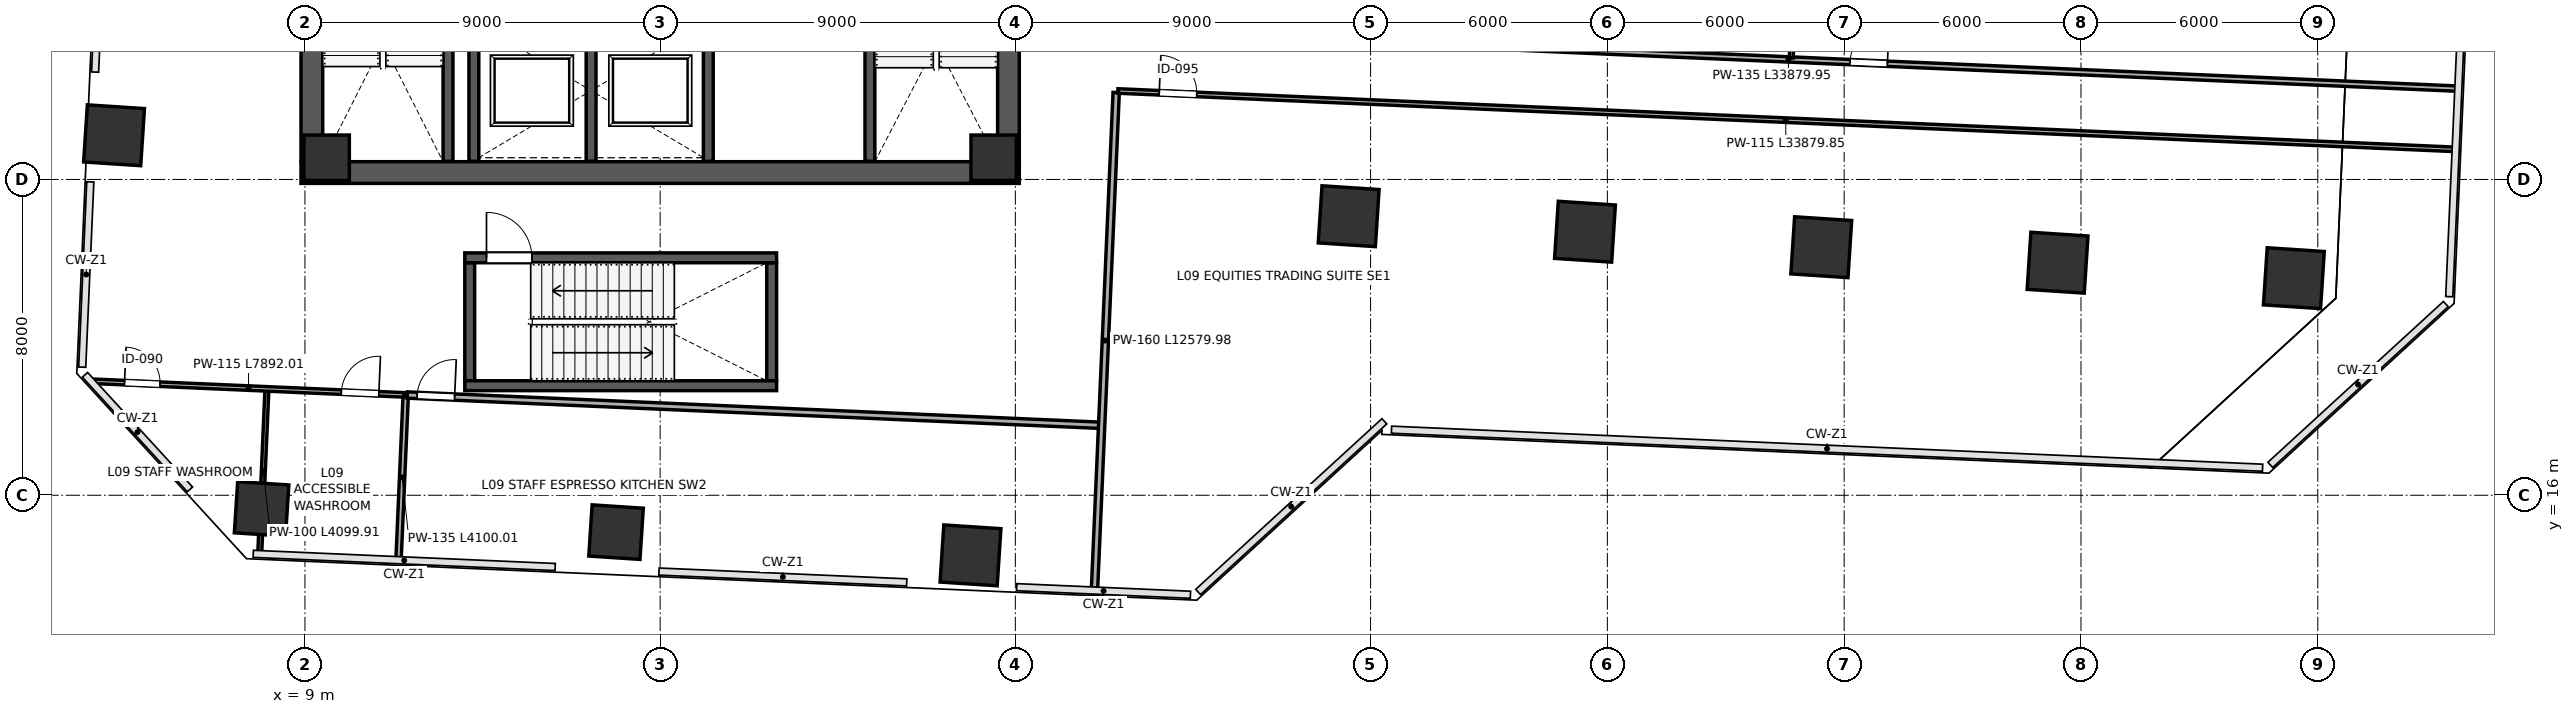
"""IFC4 building model, lengths in metres.
Left out: names, types, materials, properties, quantities, classifications, styles, units other than length and angle.
Written with IfcOpenShell. Run it as: python <this file> out.ifc"""

import sys

from ifc_helpers import new_model, si_unit, direction, frame, frame_2d, origin, origin_2d, place, context, subcontext, project, spatial, rectangle, extrude, clip, halfspace, source, transform, mapped, element, fill, save


model = new_model("IFC4")
c1 = context("Model", 3, precision=1e-05, world=origin(), true_north=direction((0.0, 1.0)))
c2 = subcontext(c1, "Body", "Model", "MODEL_VIEW")
j1 = project(units=[si_unit("LENGTHUNIT", "METRE"), si_unit("PLANEANGLEUNIT", "RADIAN")], contexts=[c1])
p1 = place(None, origin())
s1 = spatial("IfcSite", under=j1, at=p1, CompositionType="ELEMENT")
p2 = place(p1, origin())
s2 = spatial("IfcBuilding", under=s1, at=p2, CompositionType="ELEMENT")
p3 = place(p2, frame((0.0, 0.0, 42.4)))
s3 = spatial("IfcBuildingStorey", under=s2, at=p3, CompositionType="ELEMENT", Elevation=42.4)
m1 = source(origin(), c2, "Body", "SweptSolid", [
    extrude(rectangle(XDim=1.15, YDim=1.15, at=origin_2d()), origin(), (0.0, 0.0, 1.0), 4.799),
])
for number, where, z_axis, x_axis in (
    (1, (9.55, 24.55, 0.001), (0.0, 0.0, 1.0), (1.0, 0.0, 0.0)),
    (2, (26.45, 24.55, 0.001), (0.0, 0.0, 1.0), (1.0, 0.0, 0.0)),
):
    element("IfcColumn", number, at=place(p3, frame(where, z_axis=z_axis, x_axis=x_axis)), inside=s3, PredefinedType="COLUMN", context=c2, shape_type="MappedRepresentation", body=[
        mapped(m1, transform((0.0, 0.0, 0.0), scale=1.0)),
    ])
p4 = place(p3, frame((7.902, 15.654, 0.0), z_axis=(-0.073256283679, 0.062320998763, 0.995364059033), x_axis=(0.696166311011, 0.717852978143, 0.006290404147)))
e3 = element("IfcColumn", 3, at=p4, inside=s3, PredefinedType="COLUMN", context=c2, shape_type="Clipping", body=[
    clip(clip(extrude(rectangle(XDim=1.3, YDim=1.3, at=origin_2d()), origin(), (0.0, 0.0, 1.0), 4.823), halfspace(frame((0.0, 0.0, 0.068), z_axis=(0.0, 0.0, -1.0), x_axis=(1.0, 0.0, 0.0)), False)), halfspace(frame((0.0, 0.0, 4.755), z_axis=(0.0, 0.0, 1.0), x_axis=(1.0, 0.0, 0.0)), False)),
])
p5 = place(p3, frame((16.883, 15.066, 0.0), z_axis=(-0.076507759462, 0.021750714917, 0.996831715558), x_axis=(0.335583461966, 0.941996113517, 0.005202131703)))
e4 = element("IfcColumn", 4, at=p5, inside=s3, PredefinedType="COLUMN", context=c2, shape_type="Clipping", body=[
    clip(clip(extrude(rectangle(XDim=1.3, YDim=1.3, at=origin_2d()), origin(), (0.0, 0.0, 1.0), 4.815), halfspace(frame((0.0, 0.0, 0.056), z_axis=(0.0, 0.0, -1.0), x_axis=(1.0, 0.0, 0.0)), False)), halfspace(frame((0.0, 0.0, 4.759), z_axis=(0.0, 0.0, 1.0), x_axis=(1.0, 0.0, 0.0)), False)),
])
p6 = place(p3, frame((25.863, 14.477, 0.0), z_axis=(-0.079585901661, -0.018907988102, 0.996648670416), x_axis=(-0.167232150884, 0.985903030052, 0.005350051031)))
e5 = element("IfcColumn", 5, at=p6, inside=s3, PredefinedType="COLUMN", context=c2, shape_type="Clipping", body=[
    clip(clip(extrude(rectangle(XDim=1.45, YDim=1.45, at=origin_2d()), origin(), (0.0, 0.0, 1.0), 4.816), halfspace(frame((0.0, 0.0, 0.064), z_axis=(0.0, 0.0, -1.0), x_axis=(1.0, 0.0, 0.0)), False)), halfspace(frame((0.0, 0.0, 4.752), z_axis=(0.0, 0.0, 1.0), x_axis=(1.0, 0.0, 0.0)), False)),
])
p7 = place(p3, frame((35.446, 23.069, 0.0), z_axis=(-0.04118343383, -0.062789521037, 0.997176714944), x_axis=(-0.798624033663, 0.601810213736, 0.004911160636)))
e6 = element("IfcColumn", 6, at=p7, inside=s3, PredefinedType="COLUMN", context=c2, shape_type="Clipping", body=[
    clip(clip(extrude(rectangle(XDim=1.45, YDim=1.45, at=origin_2d()), origin(), (0.0, 0.0, 1.0), 4.814), halfspace(frame((0.0, 0.0, 0.059), z_axis=(0.0, 0.0, -1.0), x_axis=(1.0, 0.0, 0.0)), False)), halfspace(frame((0.0, 0.0, 4.755), z_axis=(0.0, 0.0, 1.0), x_axis=(1.0, 0.0, 0.0)), False)),
])
p8 = place(p3, frame((41.433, 22.677, 0.0), z_axis=(-0.043169759847, -0.089730344911, 0.995030068408), x_axis=(-0.870990685496, 0.491256361773, 0.006512510793)))
e7 = element("IfcColumn", 7, at=p8, inside=s3, PredefinedType="COLUMN", context=c2, shape_type="Clipping", body=[
    clip(clip(extrude(rectangle(XDim=1.45, YDim=1.45, at=origin_2d()), origin(), (0.0, 0.0, 1.0), 4.824), halfspace(frame((0.0, 0.0, 0.078), z_axis=(0.0, 0.0, -1.0), x_axis=(1.0, 0.0, 0.0)), False)), halfspace(frame((0.0, 0.0, 4.746), z_axis=(0.0, 0.0, 1.0), x_axis=(1.0, 0.0, 0.0)), False)),
])
p9 = place(p3, frame((47.42, 22.284, 0.0), z_axis=(-0.045064550485, -0.116420960772, 0.992177074006), x_axis=(-0.907151071191, 0.420725884157, 0.008164829265)))
e8 = element("IfcColumn", 8, at=p9, inside=s3, PredefinedType="COLUMN", context=c2, shape_type="Clipping", body=[
    clip(clip(extrude(rectangle(XDim=1.45, YDim=1.45, at=origin_2d()), origin(), (0.0, 0.0, 1.0), 4.838), halfspace(frame((0.0, 0.0, 0.098), z_axis=(0.0, 0.0, -1.0), x_axis=(1.0, 0.0, 0.0)), False)), halfspace(frame((0.0, 0.0, 4.74), z_axis=(0.0, 0.0, 1.0), x_axis=(1.0, 0.0, 0.0)), False)),
])
p10 = place(p3, frame((53.407, 21.892, 0.0), z_axis=(-0.046965010529, -0.142856097337, 0.988628556759), x_axis=(-0.927751383224, 0.373069215808, 0.009835199134)))
e9 = element("IfcColumn", 9, at=p10, inside=s3, PredefinedType="COLUMN", context=c2, shape_type="Clipping", body=[
    clip(clip(extrude(rectangle(XDim=1.45, YDim=1.45, at=origin_2d()), origin(), (0.0, 0.0, 1.0), 4.855), halfspace(frame((0.0, 0.0, 0.118), z_axis=(0.0, 0.0, -1.0), x_axis=(1.0, 0.0, 0.0)), False)), halfspace(frame((0.0, 0.0, 4.737), z_axis=(0.0, 0.0, 1.0), x_axis=(1.0, 0.0, 0.0)), False)),
])
p11 = place(p3, frame((59.394, 21.499, 0.0), z_axis=(-0.048816991024, -0.169031960715, 0.98440088259), x_axis=(-0.940815168833, 0.338724676328, 0.011507030043)))
e10 = element("IfcColumn", 10, at=p11, inside=s3, PredefinedType="COLUMN", context=c2, shape_type="Clipping", body=[
    clip(clip(extrude(rectangle(XDim=1.45, YDim=1.45, at=origin_2d()), origin(), (0.0, 0.0, 1.0), 4.876), halfspace(frame((0.0, 0.0, 0.138), z_axis=(0.0, 0.0, -1.0), x_axis=(1.0, 0.0, 0.0)), False)), halfspace(frame((0.0, 0.0, 4.738), z_axis=(0.0, 0.0, 1.0), x_axis=(1.0, 0.0, 0.0)), False)),
])
p12 = place(p3, frame((4.163, 25.119, 0.0), z_axis=(-0.030306808668, 0.078858518875, 0.996425025453), x_axis=(0.954818480611, 0.297138249558, 0.005525371807)))
e11 = element("IfcColumn", 11, at=p12, inside=s3, PredefinedType="COLUMN", context=c2, shape_type="Clipping", body=[
    clip(clip(extrude(rectangle(XDim=1.45, YDim=1.45, at=origin_2d()), origin(), (0.0, 0.0, 1.0), 4.817), halfspace(frame((0.0, 0.0, 0.066), z_axis=(0.0, 0.0, -1.0), x_axis=(1.0, 0.0, 0.0)), False)), halfspace(frame((0.0, 0.0, 4.751), z_axis=(0.0, 0.0, 1.0), x_axis=(1.0, 0.0, 0.0)), False)),
])
p13 = place(p3, frame((9.175, 24.45, 0.0), z_axis=(0.0, 0.0, 1.0), x_axis=(0.0, 1.0, 0.0)))
e12 = element("IfcWall", 12, at=p13, inside=s3, PredefinedType="SHEAR", context=c2, shape_type="SweptSolid", body=[
    extrude(rectangle(XDim=15.1, YDim=0.55, at=frame_2d((7.55, 0.0))), origin(), (0.0, 0.0, 1.0), 4.56),
])
p14 = place(p3, frame((26.825, 24.45, 0.0), z_axis=(0.0, 0.0, 1.0), x_axis=(0.0, 1.0, 0.0)))
e13 = element("IfcWall", 13, at=p14, inside=s3, PredefinedType="SHEAR", context=c2, shape_type="SweptSolid", body=[
    extrude(rectangle(XDim=15.1, YDim=0.55, at=frame_2d((7.55, 0.0))), origin(), (0.0, 0.0, 1.0), 4.56),
])
p15 = place(p14, frame((8.6, 0.0, 0.0)))
e14 = element("IfcOpeningElement", 14, at=p15, cuts=e13, PredefinedType="OPENING", context=c2, shape_type="SweptSolid", body=[
    extrude(rectangle(XDim=1.15, YDim=2.2, at=frame_2d((0.575, 1.1))), frame((0.0, 0.285, 0.0), z_axis=(0.0, -1.0, 0.0), x_axis=(1.0, 0.0, 0.0)), (0.0, 0.0, 1.0), 0.57),
])
p16 = place(p3, frame((8.9, 24.175, 0.0), z_axis=(0.0, 0.0, 1.0), x_axis=(1.0, 0.0, 0.0)))
e15 = element("IfcWall", 15, at=p16, inside=s3, PredefinedType="SHEAR", context=c2, shape_type="SweptSolid", body=[
    extrude(rectangle(XDim=18.2, YDim=0.55, at=frame_2d((9.1, 0.0))), origin(), (0.0, 0.0, 1.0), 4.56),
])
p17 = place(p3, frame((12.625, 24.46, 0.0), z_axis=(0.0, 0.0, 1.0), x_axis=(0.0, 1.0, 0.0)))
e16 = element("IfcWall", 16, at=p17, inside=s3, PredefinedType="SHEAR", context=c2, shape_type="SweptSolid", body=[
    extrude(rectangle(XDim=7.49, YDim=0.25, at=frame_2d((3.745, 0.0))), origin(), (0.0, 0.0, 1.0), 4.56),
])
p18 = place(p17, frame((5.85, 0.0, 0.0)))
e17 = element("IfcOpeningElement", 17, at=p18, cuts=e16, PredefinedType="OPENING", context=c2, shape_type="SweptSolid", body=[
    extrude(rectangle(XDim=1.15, YDim=2.2, at=frame_2d((0.575, 1.1))), frame((0.0, 0.135, 0.0), z_axis=(0.0, -1.0, 0.0), x_axis=(1.0, 0.0, 0.0)), (0.0, 0.0, 1.0), 0.27),
])
p19 = place(p3, frame((23.315, 24.46, 0.0), z_axis=(0.0, 0.0, 1.0), x_axis=(0.0, 1.0, 0.0)))
e18 = element("IfcWall", 18, at=p19, inside=s3, PredefinedType="SHEAR", context=c2, shape_type="SweptSolid", body=[
    extrude(rectangle(XDim=7.49, YDim=0.25, at=frame_2d((3.745, 0.0))), origin(), (0.0, 0.0, 1.0), 4.56),
])
for number, where, z_axis, x_axis in (
    (19, (13.28, 24.46, 0.0), (0.0, 0.0, 1.0), (0.0, 1.0, 0.0)),
    (20, (16.25, 24.46, 0.0), (0.0, 0.0, 1.0), (0.0, 1.0, 0.0)),
    (21, (19.22, 24.46, 0.0), (0.0, 0.0, 1.0), (0.0, 1.0, 0.0)),
):
    element("IfcWall", number, at=place(p3, frame(where, z_axis=z_axis, x_axis=x_axis)), inside=s3, PredefinedType="SHEAR", context=c2, shape_type="SweptSolid", body=[
        extrude(rectangle(XDim=3.49, YDim=0.25, at=frame_2d((1.745, 0.0))), origin(), (0.0, 0.0, 1.0), 4.56),
    ])
for number, where, z_axis, x_axis in (
    (22, (13.175, 18.9, 0.0), (0.0, 0.0, 1.0), (0.0, 1.0, 0.0)),
    (23, (20.825, 18.9, 0.0), (0.0, 0.0, 1.0), (0.0, 1.0, 0.0)),
):
    element("IfcWall", number, at=place(p3, frame(where, z_axis=z_axis, x_axis=x_axis)), inside=s3, PredefinedType="SHEAR", context=c2, shape_type="SweptSolid", body=[
        extrude(rectangle(XDim=2.99, YDim=0.25, at=frame_2d((1.495, 0.0))), origin(), (0.0, 0.0, 1.0), 4.56),
    ])
p20 = place(p3, frame((13.05, 18.775, 0.0), z_axis=(0.0, 0.0, 1.0), x_axis=(1.0, 0.0, 0.0)))
e24 = element("IfcWall", 24, at=p20, inside=s3, PredefinedType="SHEAR", context=c2, shape_type="SweptSolid", body=[
    extrude(rectangle(XDim=7.9, YDim=0.25, at=frame_2d((3.95, 0.0))), origin(), (0.0, 0.0, 1.0), 4.56),
])
p21 = place(p3, frame((13.05, 22.015, 0.0), z_axis=(0.0, 0.0, 1.0), x_axis=(1.0, 0.0, 0.0)))
e25 = element("IfcWall", 25, at=p21, inside=s3, PredefinedType="SHEAR", context=c2, shape_type="SweptSolid", body=[
    extrude(rectangle(XDim=7.9, YDim=0.25, at=frame_2d((3.95, 0.0))), origin(), (0.0, 0.0, 1.0), 4.56),
])
p22 = place(p21, frame((0.55, 0.0, 0.0)))
e26 = element("IfcOpeningElement", 26, at=p22, cuts=e25, PredefinedType="OPENING", context=c2, shape_type="SweptSolid", body=[
    extrude(rectangle(XDim=1.15, YDim=2.2, at=frame_2d((0.575, 1.1))), frame((0.0, 0.135, 0.0), z_axis=(0.0, -1.0, 0.0), x_axis=(1.0, 0.0, 0.0)), (0.0, 0.0, 1.0), 0.27),
])
p23 = place(p3, frame((7.856, 14.559, 0.0), z_axis=(0.0, 0.0, 1.0), x_axis=(0.043649126443, 0.999046922702, 0.0)))
e27 = element("IfcWall", 27, at=p23, inside=s3, PredefinedType="PARTITIONING", context=c2, shape_type="SweptSolid", body=[
    extrude(rectangle(XDim=4.1, YDim=0.1, at=frame_2d((2.05, 0.0))), origin(), (0.0, 0.0, 1.0), 3.695),
])
p24 = place(p3, frame((11.373, 14.405, 0.0), z_axis=(0.0, 0.0, 1.0), x_axis=(0.04364652983, 0.999047036147, 0.0)))
e28 = element("IfcWall", 28, at=p24, inside=s3, PredefinedType="PARTITIONING", context=c2, shape_type="SweptSolid", body=[
    extrude(rectangle(XDim=4.1, YDim=0.135, at=frame_2d((2.05, 0.0))), origin(), (0.0, 0.0, 1.0), 3.695),
])
p25 = place(p3, frame((3.629, 18.887, 0.0), z_axis=(0.0, 0.0, 1.0), x_axis=(0.999046913697, -0.043649332566, 0.0)))
e29 = element("IfcWall", 29, at=p25, inside=s3, PredefinedType="PARTITIONING", context=c2, shape_type="SweptSolid", body=[
    extrude(rectangle(XDim=7.892, YDim=0.115, at=frame_2d((3.946, 0.0))), origin(), (0.0, 0.0, 1.0), 4.56),
])
p26 = place(p25, frame((0.8, 0.0, 0.0)))
e30 = element("IfcOpeningElement", 30, at=p26, cuts=e29, PredefinedType="OPENING", context=c2, shape_type="SweptSolid", body=[
    extrude(rectangle(XDim=0.9, YDim=2.15, at=frame_2d((0.45, 1.075))), frame((0.0, 0.067, 0.0), z_axis=(0.0, -1.0, 0.0), x_axis=(1.0, 0.0, 0.0)), (0.0, 0.0, 1.0), 0.135),
])
p27 = place(p25, frame((6.3, 0.0, 0.0)))
e31 = element("IfcOpeningElement", 31, at=p27, cuts=e29, PredefinedType="OPENING", context=c2, shape_type="SweptSolid", body=[
    extrude(rectangle(XDim=0.95, YDim=2.15, at=frame_2d((0.475, 1.075))), frame((0.0, 0.067, 0.0), z_axis=(0.0, -1.0, 0.0), x_axis=(1.0, 0.0, 0.0)), (0.0, 0.0, 1.0), 0.135),
])
p28 = place(p3, frame((11.594, 18.539, 0.0), z_axis=(0.0, 0.0, 1.0), x_axis=(0.999048303008, -0.043617522367, 0.0)))
e32 = element("IfcWall", 32, at=p28, inside=s3, PredefinedType="PARTITIONING", context=c2, shape_type="SweptSolid", body=[
    extrude(rectangle(XDim=17.57, YDim=0.16, at=frame_2d((8.785, 0.0))), origin(), (0.0, 0.0, 1.0), 4.56),
])
p29 = place(p28, frame((0.25, 0.0, 0.0)))
e33 = element("IfcOpeningElement", 33, at=p29, cuts=e32, PredefinedType="OPENING", context=c2, shape_type="SweptSolid", body=[
    extrude(rectangle(XDim=0.95, YDim=2.15, at=frame_2d((0.475, 1.075))), frame((0.0, 0.09, 0.0), z_axis=(0.0, -1.0, 0.0), x_axis=(1.0, 0.0, 0.0)), (0.0, 0.0, 1.0), 0.18),
])
p30 = place(p3, frame((29.006, 13.635, 0.0), z_axis=(0.0, 0.0, 1.0), x_axis=(0.043626715414, 0.999047901605, 0.0)))
e34 = element("IfcWall", 34, at=p30, inside=s3, PredefinedType="PARTITIONING", context=c2, shape_type="SweptSolid", body=[
    extrude(rectangle(XDim=12.58, YDim=0.16, at=frame_2d((6.29, 0.0))), origin(), (0.0, 0.0, 1.0), 4.56),
])
p31 = place(p3, frame((29.664, 27.78, 0.0), z_axis=(0.0, 0.0, 1.0), x_axis=(0.999048269666, -0.043618286038, 0.0)))
e35 = element("IfcWall", 35, at=p31, inside=s3, PredefinedType="PARTITIONING", context=c2, shape_type="SweptSolid", body=[
    extrude(rectangle(XDim=33.88, YDim=0.135, at=frame_2d((16.94, 0.0))), origin(), (0.0, 0.0, 1.0), 3.695),
])
p32 = place(p31, frame((1.05, 0.0, 0.0)))
e36 = element("IfcOpeningElement", 36, at=p32, cuts=e35, PredefinedType="OPENING", context=c2, shape_type="SweptSolid", body=[
    extrude(rectangle(XDim=0.95, YDim=2.15, at=frame_2d((0.475, 1.075))), frame((0.0, 0.078, 0.0), z_axis=(0.0, -1.0, 0.0), x_axis=(1.0, 0.0, 0.0)), (0.0, 0.0, 1.0), 0.155),
])
p33 = place(p31, frame((18.5, 0.0, 0.0)))
e37 = element("IfcOpeningElement", 37, at=p33, cuts=e35, PredefinedType="OPENING", context=c2, shape_type="SweptSolid", body=[
    extrude(rectangle(XDim=0.95, YDim=2.15, at=frame_2d((0.475, 1.075))), frame((0.0, 0.078, 0.0), z_axis=(0.0, -1.0, 0.0), x_axis=(1.0, 0.0, 0.0)), (0.0, 0.0, 1.0), 0.155),
])
p34 = place(p3, frame((29.597, 26.241, 0.0), z_axis=(0.0, 0.0, 1.0), x_axis=(0.999047941909, -0.043625792456, 0.0)))
e38 = element("IfcWall", 38, at=p34, inside=s3, PredefinedType="PARTITIONING", context=c2, shape_type="SweptSolid", body=[
    extrude(rectangle(XDim=33.88, YDim=0.115, at=frame_2d((16.94, 0.0))), origin(), (0.0, 0.0, 1.0), 3.695),
])
p35 = place(p34, frame((1.05, 0.0, 0.0)))
e39 = element("IfcOpeningElement", 39, at=p35, cuts=e38, PredefinedType="OPENING", context=c2, shape_type="SweptSolid", body=[
    extrude(rectangle(XDim=0.95, YDim=2.15, at=frame_2d((0.475, 1.075))), frame((0.0, 0.067, 0.0), z_axis=(0.0, -1.0, 0.0), x_axis=(1.0, 0.0, 0.0)), (0.0, 0.0, 1.0), 0.135),
])
p36 = place(p3, frame((46.659, 27.078, 0.0), z_axis=(0.0, 0.0, 1.0), x_axis=(0.043623060059, 0.999048061222, 0.0)))
e40 = element("IfcWall", 40, at=p36, inside=s3, PredefinedType="PARTITIONING", context=c2, shape_type="SweptSolid", body=[
    extrude(rectangle(XDim=19.84, YDim=0.1, at=frame_2d((9.92, 0.0))), origin(), (0.0, 0.0, 1.0), 3.923),
])
m2 = source(origin(), c2, "Body", "SweptSolid", [
    extrude(rectangle(XDim=1.15, YDim=2.2, at=frame_2d((0.575, 1.1))), frame((0.0, 0.025, 0.0), z_axis=(0.0, -1.0, 0.0), x_axis=(1.0, 0.0, 0.0)), (0.0, 0.0, 1.0), 0.05),
])
p37 = place(p22, origin())
e41 = element("IfcDoor", 41, at=p37, inside=s3, OperationType="SINGLE_SWING_LEFT", PredefinedType="DOOR", context=c2, shape_type="MappedRepresentation", body=[
    mapped(m2, transform((0.0, 0.0, 0.0), scale=1.0)),
])
fill(e26, e41)
m3 = source(origin(), c2, "Body", "SweptSolid", [
    extrude(rectangle(XDim=0.9, YDim=2.15, at=frame_2d((0.45, 1.075))), frame((0.0, 0.025, 0.0), z_axis=(0.0, -1.0, 0.0), x_axis=(1.0, 0.0, 0.0)), (0.0, 0.0, 1.0), 0.05),
])
p38 = place(p26, origin())
e42 = element("IfcDoor", 42, at=p38, inside=s3, OperationType="SINGLE_SWING_LEFT", PredefinedType="DOOR", context=c2, shape_type="MappedRepresentation", body=[
    mapped(m3, transform((0.0, 0.0, 0.0), scale=1.0)),
])
fill(e30, e42)
m4 = source(origin(), c2, "Body", "SweptSolid", [
    extrude(rectangle(XDim=0.95, YDim=2.15, at=frame_2d((0.475, 1.075))), frame((0.0, 0.025, 0.0), z_axis=(0.0, -1.0, 0.0), x_axis=(1.0, 0.0, 0.0)), (0.0, 0.0, 1.0), 0.05),
])
p39 = place(p27, origin())
e43 = element("IfcDoor", 43, at=p39, inside=s3, OperationType="SINGLE_SWING_RIGHT", PredefinedType="DOOR", context=c2, shape_type="MappedRepresentation", body=[
    mapped(m4, transform((0.0, 0.0, 0.0), scale=1.0)),
])
fill(e31, e43)
m5 = source(origin(), c2, "Body", "SweptSolid", [
    extrude(rectangle(XDim=0.95, YDim=2.15, at=frame_2d((0.475, 1.075))), frame((0.0, 0.025, 0.0), z_axis=(0.0, -1.0, 0.0), x_axis=(1.0, 0.0, 0.0)), (0.0, 0.0, 1.0), 0.05),
])
p40 = place(p29, origin())
e44 = element("IfcDoor", 44, at=p40, inside=s3, OperationType="SINGLE_SWING_RIGHT", PredefinedType="DOOR", context=c2, shape_type="MappedRepresentation", body=[
    mapped(m5, transform((0.0, 0.0, 0.0), scale=1.0)),
])
fill(e33, e44)
p41 = place(p33, origin())
e45 = element("IfcDoor", 45, at=p41, inside=s3, OperationType="SINGLE_SWING_RIGHT", PredefinedType="DOOR", context=c2, shape_type="MappedRepresentation", body=[
    mapped(m4, transform((0.0, 0.0, 0.0), scale=1.0)),
])
fill(e37, e45)
p42 = place(p35, origin())
e46 = element("IfcDoor", 46, at=p42, inside=s3, OperationType="SINGLE_SWING_LEFT", PredefinedType="DOOR", context=c2, shape_type="MappedRepresentation", body=[
    mapped(m4, transform((0.0, 0.0, 0.0), scale=1.0)),
])
fill(e39, e46)
save(model, sys.argv[1])
